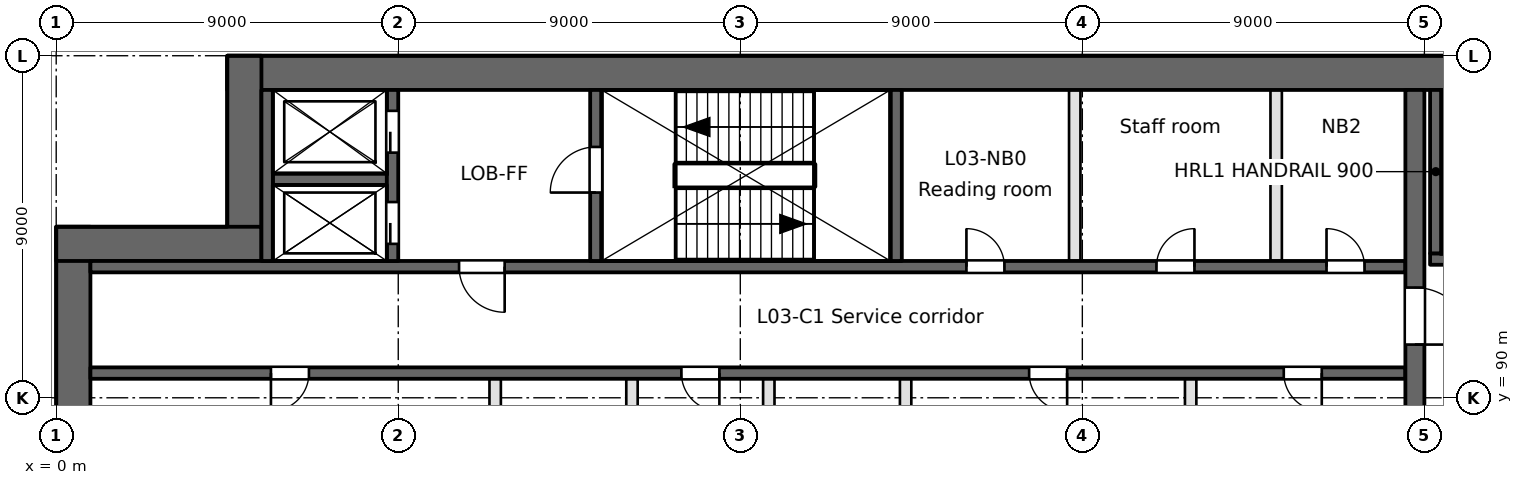
"""IFC4 building model, lengths in metres.
Left out: names, types, materials, properties, quantities, classifications, styles, units other than length and angle.
Written with IfcOpenShell. Run it as: python <this file> out.ifc"""

import sys

from ifc_helpers import new_model, si_unit, direction, frame, frame_2d, origin, place, context, subcontext, project, spatial, rectangle, extrude, element, fill, save


model = new_model("IFC4")
c1 = context("Model", 3, precision=1e-05, world=origin(), true_north=direction((0.0, 1.0)))
c2 = subcontext(c1, "Body", "Model", "MODEL_VIEW")
j1 = project(units=[si_unit("LENGTHUNIT", "METRE"), si_unit("PLANEANGLEUNIT", "RADIAN")], contexts=[c1])
p1 = place(None, origin())
s1 = spatial("IfcSite", under=j1, at=p1, CompositionType="ELEMENT")
p2 = place(p1, origin())
s2 = spatial("IfcBuilding", under=s1, at=p2, CompositionType="ELEMENT")
p3 = place(p2, frame((0.0, 0.0, 16.8)))
s3 = spatial("IfcBuildingStorey", under=s2, at=p3, CompositionType="ELEMENT", Elevation=16.8)
p4 = place(p3, frame((0.45, 94.5, 0.0), z_axis=(0.0, 0.0, 1.0), x_axis=(0.0, -1.0, 0.0)))
e1 = element("IfcWall", 1, at=p4, inside=s3, PredefinedType="SHEAR", context=c2, shape_type="SweptSolid", body=[
    extrude(rectangle(XDim=66.085, YDim=0.9, at=frame_2d((33.042, 0.0))), origin(), (0.0, 0.0, 1.0), 4.8),
])
p5 = place(p3, frame((94.5, 98.55, 0.0), z_axis=(0.0, 0.0, 1.0), x_axis=(-1.0, 0.0, 0.0)))
e2 = element("IfcWall", 2, at=p5, inside=s3, PredefinedType="SHEAR", context=c2, shape_type="SweptSolid", body=[
    extrude(rectangle(XDim=90.0, YDim=0.9, at=frame_2d((45.0, 0.0))), origin(), (0.0, 0.0, 1.0), 4.8),
])
for number, where, z_axis, x_axis in (
    (3, (4.95, 99.0, 0.0), (0.0, 0.0, 1.0), (0.0, -1.0, 0.0)),
    (4, (5.4, 94.05, 0.0), (0.0, 0.0, 1.0), (-1.0, 0.0, 0.0)),
):
    element("IfcWall", number, at=place(p3, frame(where, z_axis=z_axis, x_axis=x_axis)), inside=s3, PredefinedType="SHEAR", context=c2, shape_type="SweptSolid", body=[
        extrude(rectangle(XDim=5.4, YDim=0.9, at=frame_2d((2.7, 0.0))), origin(), (0.0, 0.0, 1.0), 4.8),
    ])
p6 = place(p3, frame((0.9, 90.65, -0.35), z_axis=(0.0, 0.0, 1.0), x_axis=(1.0, 0.0, 0.0)))
e5 = element("IfcWall", 5, at=p6, inside=s3, PredefinedType="SOLIDWALL", context=c2, shape_type="SweptSolid", body=[
    extrude(rectangle(XDim=34.6, YDim=0.3, at=frame_2d((17.3, 0.0))), origin(), (0.0, 0.0, 1.0), 4.8),
])
p7 = place(p6, frame((4.75, 0.0, 0.35)))
e6 = element("IfcOpeningElement", 6, at=p7, cuts=e5, PredefinedType="OPENING", context=c2, shape_type="SweptSolid", body=[
    extrude(rectangle(XDim=1.0, YDim=2.1, at=frame_2d((0.5, 1.05))), frame((0.0, 0.15, 0.0), z_axis=(0.0, -1.0, 0.0), x_axis=(1.0, 0.0, 0.0)), (0.0, 0.0, 1.0), 0.3),
])
p8 = place(p6, frame((24.7, 0.0, 0.35)))
e7 = element("IfcOpeningElement", 7, at=p8, cuts=e5, PredefinedType="OPENING", context=c2, shape_type="SweptSolid", body=[
    extrude(rectangle(XDim=1.0, YDim=2.1, at=frame_2d((0.5, 1.05))), frame((0.0, 0.15, 0.0), z_axis=(0.0, -1.0, 0.0), x_axis=(1.0, 0.0, 0.0)), (0.0, 0.0, 1.0), 0.3),
])
p9 = place(p6, frame((15.55, 0.0, 0.35)))
e8 = element("IfcOpeningElement", 8, at=p9, cuts=e5, PredefinedType="OPENING", context=c2, shape_type="SweptSolid", body=[
    extrude(rectangle(XDim=1.0, YDim=2.1, at=frame_2d((0.5, 1.05))), frame((0.0, 0.15, 0.0), z_axis=(0.0, -1.0, 0.0), x_axis=(1.0, 0.0, 0.0)), (0.0, 0.0, 1.0), 0.3),
])
p10 = place(p6, frame((31.4, 0.0, 0.35)))
e9 = element("IfcOpeningElement", 9, at=p10, cuts=e5, PredefinedType="OPENING", context=c2, shape_type="SweptSolid", body=[
    extrude(rectangle(XDim=1.0, YDim=2.1, at=frame_2d((0.5, 1.05))), frame((0.0, 0.15, 0.0), z_axis=(0.0, -1.0, 0.0), x_axis=(1.0, 0.0, 0.0)), (0.0, 0.0, 1.0), 0.3),
])
p11 = place(p3, frame((0.9, 93.45, -0.35), z_axis=(0.0, 0.0, 1.0), x_axis=(1.0, 0.0, 0.0)))
e10 = element("IfcWall", 10, at=p11, inside=s3, PredefinedType="SOLIDWALL", context=c2, shape_type="SweptSolid", body=[
    extrude(rectangle(XDim=34.6, YDim=0.3, at=frame_2d((17.3, 0.0))), origin(), (0.0, 0.0, 1.0), 4.8),
])
p12 = place(p11, frame((9.7, 0.0, 0.35)))
e11 = element("IfcOpeningElement", 11, at=p12, cuts=e10, PredefinedType="OPENING", context=c2, shape_type="SweptSolid", body=[
    extrude(rectangle(XDim=1.2, YDim=2.1, at=frame_2d((0.6, 1.05))), frame((0.0, 0.15, 0.0), z_axis=(0.0, -1.0, 0.0), x_axis=(1.0, 0.0, 0.0)), (0.0, 0.0, 1.0), 0.3),
])
p13 = place(p11, frame((23.05, 0.0, 0.35)))
e12 = element("IfcOpeningElement", 12, at=p13, cuts=e10, PredefinedType="OPENING", context=c2, shape_type="SweptSolid", body=[
    extrude(rectangle(XDim=1.0, YDim=2.1, at=frame_2d((0.5, 1.05))), frame((0.0, 0.15, 0.0), z_axis=(0.0, -1.0, 0.0), x_axis=(1.0, 0.0, 0.0)), (0.0, 0.0, 1.0), 0.3),
])
p14 = place(p11, frame((28.05, 0.0, 0.35)))
e13 = element("IfcOpeningElement", 13, at=p14, cuts=e10, PredefinedType="OPENING", context=c2, shape_type="SweptSolid", body=[
    extrude(rectangle(XDim=1.0, YDim=2.1, at=frame_2d((0.5, 1.05))), frame((0.0, 0.15, 0.0), z_axis=(0.0, -1.0, 0.0), x_axis=(1.0, 0.0, 0.0)), (0.0, 0.0, 1.0), 0.3),
])
p15 = place(p11, frame((32.525, 0.0, 0.35)))
e14 = element("IfcOpeningElement", 14, at=p15, cuts=e10, PredefinedType="OPENING", context=c2, shape_type="SweptSolid", body=[
    extrude(rectangle(XDim=1.0, YDim=2.1, at=frame_2d((0.5, 1.05))), frame((0.0, 0.15, 0.0), z_axis=(0.0, -1.0, 0.0), x_axis=(1.0, 0.0, 0.0)), (0.0, 0.0, 1.0), 0.3),
])
p16 = place(p3, frame((36.15, 93.65, -0.35), z_axis=(0.0, 0.0, 1.0), x_axis=(1.0, 0.0, 0.0)))
e15 = element("IfcWall", 15, at=p16, inside=s3, PredefinedType="SOLIDWALL", context=c2, shape_type="SweptSolid", body=[
    extrude(rectangle(XDim=8.2, YDim=0.3, at=frame_2d((4.1, 0.0))), origin(), (0.0, 0.0, 1.0), 4.8),
])
p17 = place(p16, frame((0.7, 0.0, 0.35)))
e16 = element("IfcOpeningElement", 16, at=p17, cuts=e15, PredefinedType="OPENING", context=c2, shape_type="SweptSolid", body=[
    extrude(rectangle(XDim=1.2, YDim=2.1, at=frame_2d((0.6, 1.05))), frame((0.0, 0.15, 0.0), z_axis=(0.0, -1.0, 0.0), x_axis=(1.0, 0.0, 0.0)), (0.0, 0.0, 1.0), 0.3),
])
p18 = place(p3, frame((5.7, 95.75, -0.35), z_axis=(0.0, 0.0, 1.0), x_axis=(1.0, 0.0, 0.0)))
e17 = element("IfcWall", 17, at=p18, inside=s3, PredefinedType="SOLIDWALL", context=c2, shape_type="SweptSolid", body=[
    extrude(rectangle(XDim=3.0, YDim=0.3, at=frame_2d((1.5, 0.0))), origin(), (0.0, 0.0, 1.0), 4.8),
])
p19 = place(p3, frame((5.55, 93.6, -0.35), z_axis=(0.0, 0.0, 1.0), x_axis=(0.0, 1.0, 0.0)))
e18 = element("IfcWall", 18, at=p19, inside=s3, PredefinedType="SOLIDWALL", context=c2, shape_type="SweptSolid", body=[
    extrude(rectangle(XDim=4.5, YDim=0.3, at=frame_2d((2.25, 0.0))), origin(), (0.0, 0.0, 1.0), 4.8),
])
p20 = place(p3, frame((8.85, 93.6, -0.35), z_axis=(0.0, 0.0, 1.0), x_axis=(0.0, 1.0, 0.0)))
e19 = element("IfcWall", 19, at=p20, inside=s3, PredefinedType="SOLIDWALL", context=c2, shape_type="SweptSolid", body=[
    extrude(rectangle(XDim=4.5, YDim=0.3, at=frame_2d((2.25, 0.0))), origin(), (0.0, 0.0, 1.0), 4.8),
])
p21 = place(p20, frame((0.45, 0.0, 0.35)))
e20 = element("IfcOpeningElement", 20, at=p21, cuts=e19, PredefinedType="OPENING", context=c2, shape_type="SweptSolid", body=[
    extrude(rectangle(XDim=1.1, YDim=2.1, at=frame_2d((0.55, 1.05))), frame((0.0, 0.15, 0.0), z_axis=(0.0, -1.0, 0.0), x_axis=(1.0, 0.0, 0.0)), (0.0, 0.0, 1.0), 0.3),
])
p22 = place(p20, frame((2.85, 0.0, 0.35)))
e21 = element("IfcOpeningElement", 21, at=p22, cuts=e19, PredefinedType="OPENING", context=c2, shape_type="SweptSolid", body=[
    extrude(rectangle(XDim=1.1, YDim=2.1, at=frame_2d((0.55, 1.05))), frame((0.0, 0.15, 0.0), z_axis=(0.0, -1.0, 0.0), x_axis=(1.0, 0.0, 0.0)), (0.0, 0.0, 1.0), 0.3),
])
p23 = place(p3, frame((11.55, 87.95, 0.0), z_axis=(0.0, 0.0, 1.0), x_axis=(0.0, 1.0, 0.0)))
e22 = element("IfcWall", 22, at=p23, inside=s3, PredefinedType="PARTITIONING", context=c2, shape_type="SweptSolid", body=[
    extrude(rectangle(XDim=2.55, YDim=0.3, at=frame_2d((1.275, 0.0))), origin(), (0.0, 0.0, 1.0), 4.45),
])
p24 = place(p3, frame((14.2, 93.6, -0.35), z_axis=(0.0, 0.0, 1.0), x_axis=(0.0, 1.0, 0.0)))
e23 = element("IfcWall", 23, at=p24, inside=s3, PredefinedType="SOLIDWALL", context=c2, shape_type="SweptSolid", body=[
    extrude(rectangle(XDim=4.5, YDim=0.3, at=frame_2d((2.25, 0.0))), origin(), (0.0, 0.0, 1.0), 4.8),
])
p25 = place(p24, frame((1.8, 0.0, 0.35)))
e24 = element("IfcOpeningElement", 24, at=p25, cuts=e23, PredefinedType="OPENING", context=c2, shape_type="SweptSolid", body=[
    extrude(rectangle(XDim=1.2, YDim=2.1, at=frame_2d((0.6, 1.05))), frame((0.0, 0.15, 0.0), z_axis=(0.0, -1.0, 0.0), x_axis=(1.0, 0.0, 0.0)), (0.0, 0.0, 1.0), 0.3),
])
for number, where, z_axis, x_axis in (
    (25, (15.15, 77.55, 0.0), (0.0, 0.0, 1.0), (0.0, 1.0, 0.0)),
    (26, (18.75, 77.55, 0.0), (0.0, 0.0, 1.0), (0.0, 1.0, 0.0)),
):
    element("IfcWall", number, at=place(p3, frame(where, z_axis=z_axis, x_axis=x_axis)), inside=s3, PredefinedType="PARTITIONING", context=c2, shape_type="SweptSolid", body=[
        extrude(rectangle(XDim=12.95, YDim=0.3, at=frame_2d((6.475, 0.0))), origin(), (0.0, 0.0, 1.0), 4.45),
    ])
p26 = place(p3, frame((22.1, 93.6, -0.35), z_axis=(0.0, 0.0, 1.0), x_axis=(0.0, 1.0, 0.0)))
e27 = element("IfcWall", 27, at=p26, inside=s3, PredefinedType="SOLIDWALL", context=c2, shape_type="SweptSolid", body=[
    extrude(rectangle(XDim=4.5, YDim=0.3, at=frame_2d((2.25, 0.0))), origin(), (0.0, 0.0, 1.0), 4.8),
])
p27 = place(p3, frame((22.35, 87.95, 0.0), z_axis=(0.0, 0.0, 1.0), x_axis=(0.0, 1.0, 0.0)))
e28 = element("IfcWall", 28, at=p27, inside=s3, PredefinedType="PARTITIONING", context=c2, shape_type="SweptSolid", body=[
    extrude(rectangle(XDim=2.55, YDim=0.3, at=frame_2d((1.275, 0.0))), origin(), (0.0, 0.0, 1.0), 4.45),
])
p28 = place(p3, frame((26.8, 93.6, 0.0), z_axis=(0.0, 0.0, 1.0), x_axis=(0.0, 1.0, 0.0)))
e29 = element("IfcWall", 29, at=p28, inside=s3, PredefinedType="PARTITIONING", context=c2, shape_type="SweptSolid", body=[
    extrude(rectangle(XDim=4.5, YDim=0.3, at=frame_2d((2.25, 0.0))), origin(), (0.0, 0.0, 1.0), 4.45),
])
p29 = place(p3, frame((29.85, 87.95, 0.0), z_axis=(0.0, 0.0, 1.0), x_axis=(0.0, 1.0, 0.0)))
e30 = element("IfcWall", 30, at=p29, inside=s3, PredefinedType="PARTITIONING", context=c2, shape_type="SweptSolid", body=[
    extrude(rectangle(XDim=2.55, YDim=0.3, at=frame_2d((1.275, 0.0))), origin(), (0.0, 0.0, 1.0), 4.45),
])
p30 = place(p3, frame((32.1, 93.6, 0.0), z_axis=(0.0, 0.0, 1.0), x_axis=(0.0, 1.0, 0.0)))
e31 = element("IfcWall", 31, at=p30, inside=s3, PredefinedType="PARTITIONING", context=c2, shape_type="SweptSolid", body=[
    extrude(rectangle(XDim=4.5, YDim=0.3, at=frame_2d((2.25, 0.0))), origin(), (0.0, 0.0, 1.0), 4.45),
])
p31 = place(p3, frame((35.75, 63.5, -0.35), z_axis=(0.0, 0.0, 1.0), x_axis=(0.0, 1.0, 0.0)))
e32 = element("IfcWall", 32, at=p31, inside=s3, PredefinedType="SOLIDWALL", context=c2, shape_type="SweptSolid", body=[
    extrude(rectangle(XDim=34.6, YDim=0.5, at=frame_2d((17.3, 0.0))), origin(), (0.0, 0.0, 1.0), 4.8),
])
p32 = place(p31, frame((9.7, 0.0, 0.35)))
e33 = element("IfcOpeningElement", 33, at=p32, cuts=e32, PredefinedType="OPENING", context=c2, shape_type="SweptSolid", body=[
    extrude(rectangle(XDim=2.4, YDim=2.1, at=frame_2d((1.2, 1.05))), frame((0.0, 0.25, 0.0), z_axis=(0.0, -1.0, 0.0), x_axis=(1.0, 0.0, 0.0)), (0.0, 0.0, 1.0), 0.5),
])
p33 = place(p31, frame((27.9, 0.0, 0.35)))
e34 = element("IfcOpeningElement", 34, at=p33, cuts=e32, PredefinedType="OPENING", context=c2, shape_type="SweptSolid", body=[
    extrude(rectangle(XDim=1.5, YDim=2.1, at=frame_2d((0.75, 1.05))), frame((0.0, 0.25, 0.0), z_axis=(0.0, -1.0, 0.0), x_axis=(1.0, 0.0, 0.0)), (0.0, 0.0, 1.0), 0.5),
])
p34 = place(p31, frame((1.5, 0.0, 0.35)))
e35 = element("IfcOpeningElement", 35, at=p34, cuts=e32, PredefinedType="OPENING", context=c2, shape_type="SweptSolid", body=[
    extrude(rectangle(XDim=1.2, YDim=2.1, at=frame_2d((0.6, 1.05))), frame((0.0, 0.25, 0.0), z_axis=(0.0, -1.0, 0.0), x_axis=(1.0, 0.0, 0.0)), (0.0, 0.0, 1.0), 0.5),
])
p35 = place(p3, frame((36.3, 93.8, -0.35), z_axis=(0.0, 0.0, 1.0), x_axis=(0.0, 1.0, 0.0)))
e36 = element("IfcWall", 36, at=p35, inside=s3, PredefinedType="SOLIDWALL", context=c2, shape_type="SweptSolid", body=[
    extrude(rectangle(XDim=4.3, YDim=0.3, at=frame_2d((2.15, 0.0))), origin(), (0.0, 0.0, 1.0), 4.8),
])
p36 = place(p21, origin())
e37 = element("IfcDoor", 37, at=p36, inside=s3, OperationType="SLIDING_TO_RIGHT", PredefinedType="DOOR", context=c2, shape_type="SweptSolid", body=[
    extrude(rectangle(XDim=1.1, YDim=2.1, at=frame_2d((0.55, 1.05))), frame((0.0, 0.025, 0.0), z_axis=(0.0, -1.0, 0.0), x_axis=(1.0, 0.0, 0.0)), (0.0, 0.0, 1.0), 0.05),
])
fill(e20, e37)
p37 = place(p22, origin())
e38 = element("IfcDoor", 38, at=p37, inside=s3, OperationType="SLIDING_TO_LEFT", PredefinedType="DOOR", context=c2, shape_type="SweptSolid", body=[
    extrude(rectangle(XDim=1.1, YDim=2.1, at=frame_2d((0.55, 1.05))), frame((0.0, 0.025, 0.0), z_axis=(0.0, -1.0, 0.0), x_axis=(1.0, 0.0, 0.0)), (0.0, 0.0, 1.0), 0.05),
])
fill(e21, e38)
p38 = place(p12, frame((1.2, 0.0, 0.0), z_axis=(0.0, 0.0, 1.0), x_axis=(-1.0, 0.0, 0.0)))
e39 = element("IfcDoor", 39, at=p38, inside=s3, OperationType="SINGLE_SWING_LEFT", PredefinedType="DOOR", context=c2, shape_type="SweptSolid", body=[
    extrude(rectangle(XDim=1.2, YDim=2.1, at=frame_2d((0.6, 1.05))), frame((0.0, 0.025, 0.0), z_axis=(0.0, -1.0, 0.0), x_axis=(1.0, 0.0, 0.0)), (0.0, 0.0, 1.0), 0.05),
])
fill(e11, e39)
p39 = place(p33, frame((1.5, 0.0, 0.0), z_axis=(0.0, 0.0, 1.0), x_axis=(-1.0, 0.0, 0.0)))
e40 = element("IfcDoor", 40, at=p39, inside=s3, OperationType="SINGLE_SWING_RIGHT", PredefinedType="DOOR", context=c2, shape_type="SweptSolid", body=[
    extrude(rectangle(XDim=1.5, YDim=2.1, at=frame_2d((0.75, 1.05))), frame((0.0, 0.025, 0.0), z_axis=(0.0, -1.0, 0.0), x_axis=(1.0, 0.0, 0.0)), (0.0, 0.0, 1.0), 0.05),
])
fill(e34, e40)
p40 = place(p25, origin())
e41 = element("IfcDoor", 41, at=p40, inside=s3, OperationType="SINGLE_SWING_LEFT", PredefinedType="DOOR", context=c2, shape_type="SweptSolid", body=[
    extrude(rectangle(XDim=1.2, YDim=2.1, at=frame_2d((0.6, 1.05))), frame((0.0, 0.025, 0.0), z_axis=(0.0, -1.0, 0.0), x_axis=(1.0, 0.0, 0.0)), (0.0, 0.0, 1.0), 0.05),
])
fill(e24, e41)
p41 = place(p7, frame((1.0, 0.0, 0.0), z_axis=(0.0, 0.0, 1.0), x_axis=(-1.0, 0.0, 0.0)))
e42 = element("IfcDoor", 42, at=p41, inside=s3, OperationType="SINGLE_SWING_RIGHT", PredefinedType="DOOR", context=c2, shape_type="SweptSolid", body=[
    extrude(rectangle(XDim=1.0, YDim=2.1, at=frame_2d((0.5, 1.05))), frame((0.0, 0.025, 0.0), z_axis=(0.0, -1.0, 0.0), x_axis=(1.0, 0.0, 0.0)), (0.0, 0.0, 1.0), 0.05),
])
fill(e6, e42)
p42 = place(p8, frame((1.0, 0.0, 0.0), z_axis=(0.0, 0.0, 1.0), x_axis=(-1.0, 0.0, 0.0)))
e43 = element("IfcDoor", 43, at=p42, inside=s3, OperationType="SINGLE_SWING_LEFT", PredefinedType="DOOR", context=c2, shape_type="SweptSolid", body=[
    extrude(rectangle(XDim=1.0, YDim=2.1, at=frame_2d((0.5, 1.05))), frame((0.0, 0.025, 0.0), z_axis=(0.0, -1.0, 0.0), x_axis=(1.0, 0.0, 0.0)), (0.0, 0.0, 1.0), 0.05),
])
fill(e7, e43)
p43 = place(p9, frame((1.0, 0.0, 0.0), z_axis=(0.0, 0.0, 1.0), x_axis=(-1.0, 0.0, 0.0)))
e44 = element("IfcDoor", 44, at=p43, inside=s3, OperationType="SINGLE_SWING_LEFT", PredefinedType="DOOR", context=c2, shape_type="SweptSolid", body=[
    extrude(rectangle(XDim=1.0, YDim=2.1, at=frame_2d((0.5, 1.05))), frame((0.0, 0.025, 0.0), z_axis=(0.0, -1.0, 0.0), x_axis=(1.0, 0.0, 0.0)), (0.0, 0.0, 1.0), 0.05),
])
fill(e8, e44)
p44 = place(p10, frame((1.0, 0.0, 0.0), z_axis=(0.0, 0.0, 1.0), x_axis=(-1.0, 0.0, 0.0)))
e45 = element("IfcDoor", 45, at=p44, inside=s3, OperationType="SINGLE_SWING_LEFT", PredefinedType="DOOR", context=c2, shape_type="SweptSolid", body=[
    extrude(rectangle(XDim=1.0, YDim=2.1, at=frame_2d((0.5, 1.05))), frame((0.0, 0.025, 0.0), z_axis=(0.0, -1.0, 0.0), x_axis=(1.0, 0.0, 0.0)), (0.0, 0.0, 1.0), 0.05),
])
fill(e9, e45)
p45 = place(p13, origin())
e46 = element("IfcDoor", 46, at=p45, inside=s3, OperationType="SINGLE_SWING_LEFT", PredefinedType="DOOR", context=c2, shape_type="SweptSolid", body=[
    extrude(rectangle(XDim=1.0, YDim=2.1, at=frame_2d((0.5, 1.05))), frame((0.0, 0.025, 0.0), z_axis=(0.0, -1.0, 0.0), x_axis=(1.0, 0.0, 0.0)), (0.0, 0.0, 1.0), 0.05),
])
fill(e12, e46)
p46 = place(p14, origin())
e47 = element("IfcDoor", 47, at=p46, inside=s3, OperationType="SINGLE_SWING_RIGHT", PredefinedType="DOOR", context=c2, shape_type="SweptSolid", body=[
    extrude(rectangle(XDim=1.0, YDim=2.1, at=frame_2d((0.5, 1.05))), frame((0.0, 0.025, 0.0), z_axis=(0.0, -1.0, 0.0), x_axis=(1.0, 0.0, 0.0)), (0.0, 0.0, 1.0), 0.05),
])
fill(e13, e47)
p47 = place(p15, origin())
e48 = element("IfcDoor", 48, at=p47, inside=s3, OperationType="SINGLE_SWING_LEFT", PredefinedType="DOOR", context=c2, shape_type="SweptSolid", body=[
    extrude(rectangle(XDim=1.0, YDim=2.1, at=frame_2d((0.5, 1.05))), frame((0.0, 0.025, 0.0), z_axis=(0.0, -1.0, 0.0), x_axis=(1.0, 0.0, 0.0)), (0.0, 0.0, 1.0), 0.05),
])
fill(e14, e48)
save(model, sys.argv[1])
